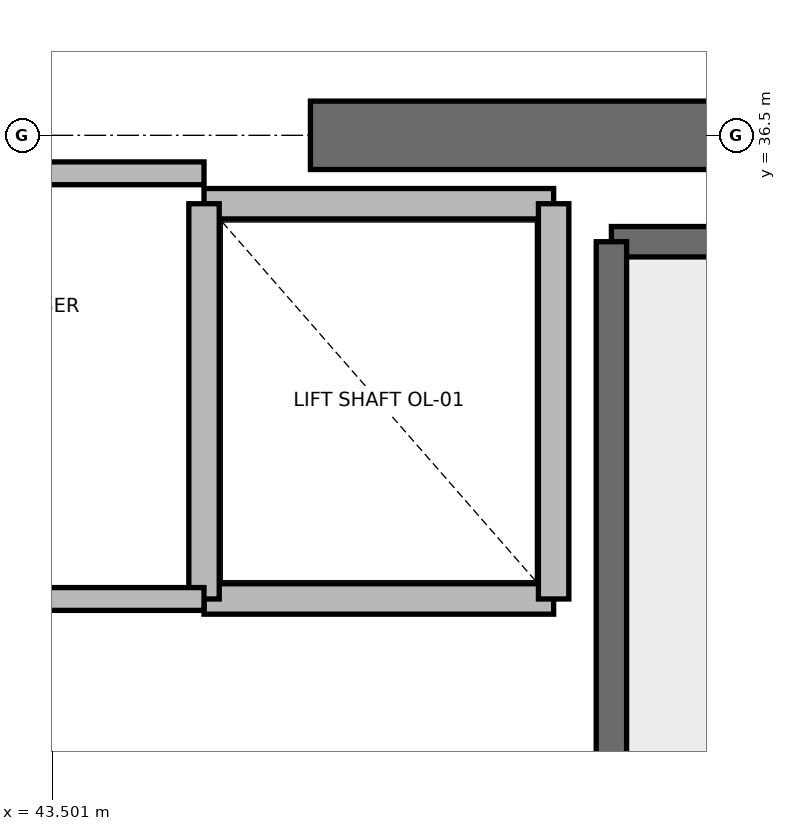
"""IFC4 building model, lengths in metres.
Left out: names, types, materials, properties, quantities, classifications, styles, units other than length and angle.
Written with IfcOpenShell. Run it as: python <this file> out.ifc"""

import sys

from ifc_helpers import new_model, si_unit, direction, frame, frame_2d, origin, place, context, subcontext, project, spatial, rectangle, extrude, element, save


model = new_model("IFC4")
c1 = context("Model", 3, precision=1e-05, world=origin(), true_north=direction((0.0, 1.0)))
c2 = subcontext(c1, "Body", "Model", "MODEL_VIEW")
j1 = project(units=[si_unit("LENGTHUNIT", "METRE"), si_unit("PLANEANGLEUNIT", "RADIAN")], contexts=[c1])
p1 = place(None, origin())
s1 = spatial("IfcSite", under=j1, at=p1, CompositionType="ELEMENT")
p2 = place(p1, origin())
s2 = spatial("IfcBuilding", under=s1, at=p2, CompositionType="ELEMENT")
p3 = place(p2, frame((0.0, 0.0, 291.2)))
s3 = spatial("IfcBuildingStorey", under=s2, at=p3, CompositionType="ELEMENT", Elevation=291.2)
p4 = place(p3, frame((45.2, 36.5, 0.0), z_axis=(0.0, 0.0, 1.0), x_axis=(1.0, 0.0, 0.0)))
e1 = element("IfcWall", 1, at=p4, inside=s3, PredefinedType="SHEAR", context=c2, shape_type="SweptSolid", body=[
    extrude(rectangle(XDim=5.8, YDim=0.45, at=frame_2d((2.9, 0.0))), origin(), (0.0, 0.0, 1.0), 3.7),
])
p5 = place(p3, frame((47.18, 35.8, 0.0), z_axis=(0.0, 0.0, 1.0), x_axis=(1.0, 0.0, 0.0)))
e2 = element("IfcWall", 2, at=p5, inside=s3, PredefinedType="SOLIDWALL", context=c2, shape_type="SweptSolid", body=[
    extrude(rectangle(XDim=3.12, YDim=0.2, at=frame_2d((1.56, 0.0))), origin(), (0.0, 0.0, 1.0), 3.7),
])
p6 = place(p3, frame((47.18, 27.62, 0.0), z_axis=(0.0, 0.0, 1.0), x_axis=(0.0, 1.0, 0.0)))
e3 = element("IfcWall", 3, at=p6, inside=s3, PredefinedType="SOLIDWALL", context=c2, shape_type="SweptSolid", body=[
    extrude(rectangle(XDim=8.18, YDim=0.2, at=frame_2d((4.09, 0.0))), origin(), (0.0, 0.0, 1.0), 3.7),
])
p7 = place(p3, frame((44.5, 33.45, 0.0), z_axis=(0.0, 0.0, 1.0), x_axis=(1.0, 0.0, 0.0)))
e4 = element("IfcWall", 4, at=p7, inside=s3, PredefinedType="SOLIDWALL", context=c2, shape_type="SweptSolid", body=[
    extrude(rectangle(XDim=2.3, YDim=0.2, at=frame_2d((1.15, 0.0))), origin(), (0.0, 0.0, 1.0), 3.7),
])
p8 = place(p3, frame((46.8, 36.05, 0.0), z_axis=(0.0, 0.0, 1.0), x_axis=(-1.0, 0.0, 0.0)))
e5 = element("IfcWall", 5, at=p8, inside=s3, PredefinedType="SOLIDWALL", context=c2, shape_type="SweptSolid", body=[
    extrude(rectangle(XDim=2.3, YDim=0.2, at=frame_2d((1.15, 0.0))), origin(), (0.0, 0.0, 1.0), 2.78),
])
p9 = place(p3, frame((44.5, 36.05, 0.0), z_axis=(0.0, 0.0, 1.0), x_axis=(0.0, -1.0, 0.0)))
e6 = element("IfcWall", 6, at=p9, inside=s3, PredefinedType="SOLIDWALL", context=c2, shape_type="SweptSolid", body=[
    extrude(rectangle(XDim=2.6, YDim=0.2, at=frame_2d((1.3, 0.0))), origin(), (0.0, 0.0, 1.0), 2.78),
])
p10 = place(p3, frame((46.8, 33.45, 0.0), z_axis=(0.0, 0.0, 1.0), x_axis=(0.0, 1.0, 0.0)))
e7 = element("IfcWall", 7, at=p10, inside=s3, PredefinedType="SOLIDWALL", context=c2, shape_type="SweptSolid", body=[
    extrude(rectangle(XDim=2.6, YDim=0.2, at=frame_2d((1.3, 0.0))), origin(), (0.0, 0.0, 1.0), 3.7),
])
p11 = place(p3, frame((41.56, 36.25, 0.0), z_axis=(0.0, 0.0, 1.0), x_axis=(1.0, 0.0, 0.0)))
e8 = element("IfcWall", 8, at=p11, inside=s3, PredefinedType="PARTITIONING", context=c2, shape_type="SweptSolid", body=[
    extrude(rectangle(XDim=2.94, YDim=0.15, at=frame_2d((1.47, 0.0))), origin(), (0.0, 0.0, 1.0), 2.78),
])
p12 = place(p3, frame((41.56, 33.45, 0.0), z_axis=(0.0, 0.0, 1.0), x_axis=(1.0, 0.0, 0.0)))
e9 = element("IfcWall", 9, at=p12, inside=s3, PredefinedType="PARTITIONING", context=c2, shape_type="SweptSolid", body=[
    extrude(rectangle(XDim=2.94, YDim=0.15, at=frame_2d((1.47, 0.0))), origin(), (0.0, 0.0, 1.0), 2.85),
])
p13 = place(p12, frame((1.03, 0.0, 0.0)))
e10 = element("IfcOpeningElement", 10, at=p13, cuts=e9, PredefinedType="OPENING", context=c2, shape_type="SweptSolid", body=[
    extrude(rectangle(XDim=0.88, YDim=2.1, at=frame_2d((0.44, 1.05))), frame((0.0, 0.075, 0.0), z_axis=(0.0, -1.0, 0.0), x_axis=(1.0, 0.0, 0.0)), (0.0, 0.0, 1.0), 0.15),
])
save(model, sys.argv[1])
